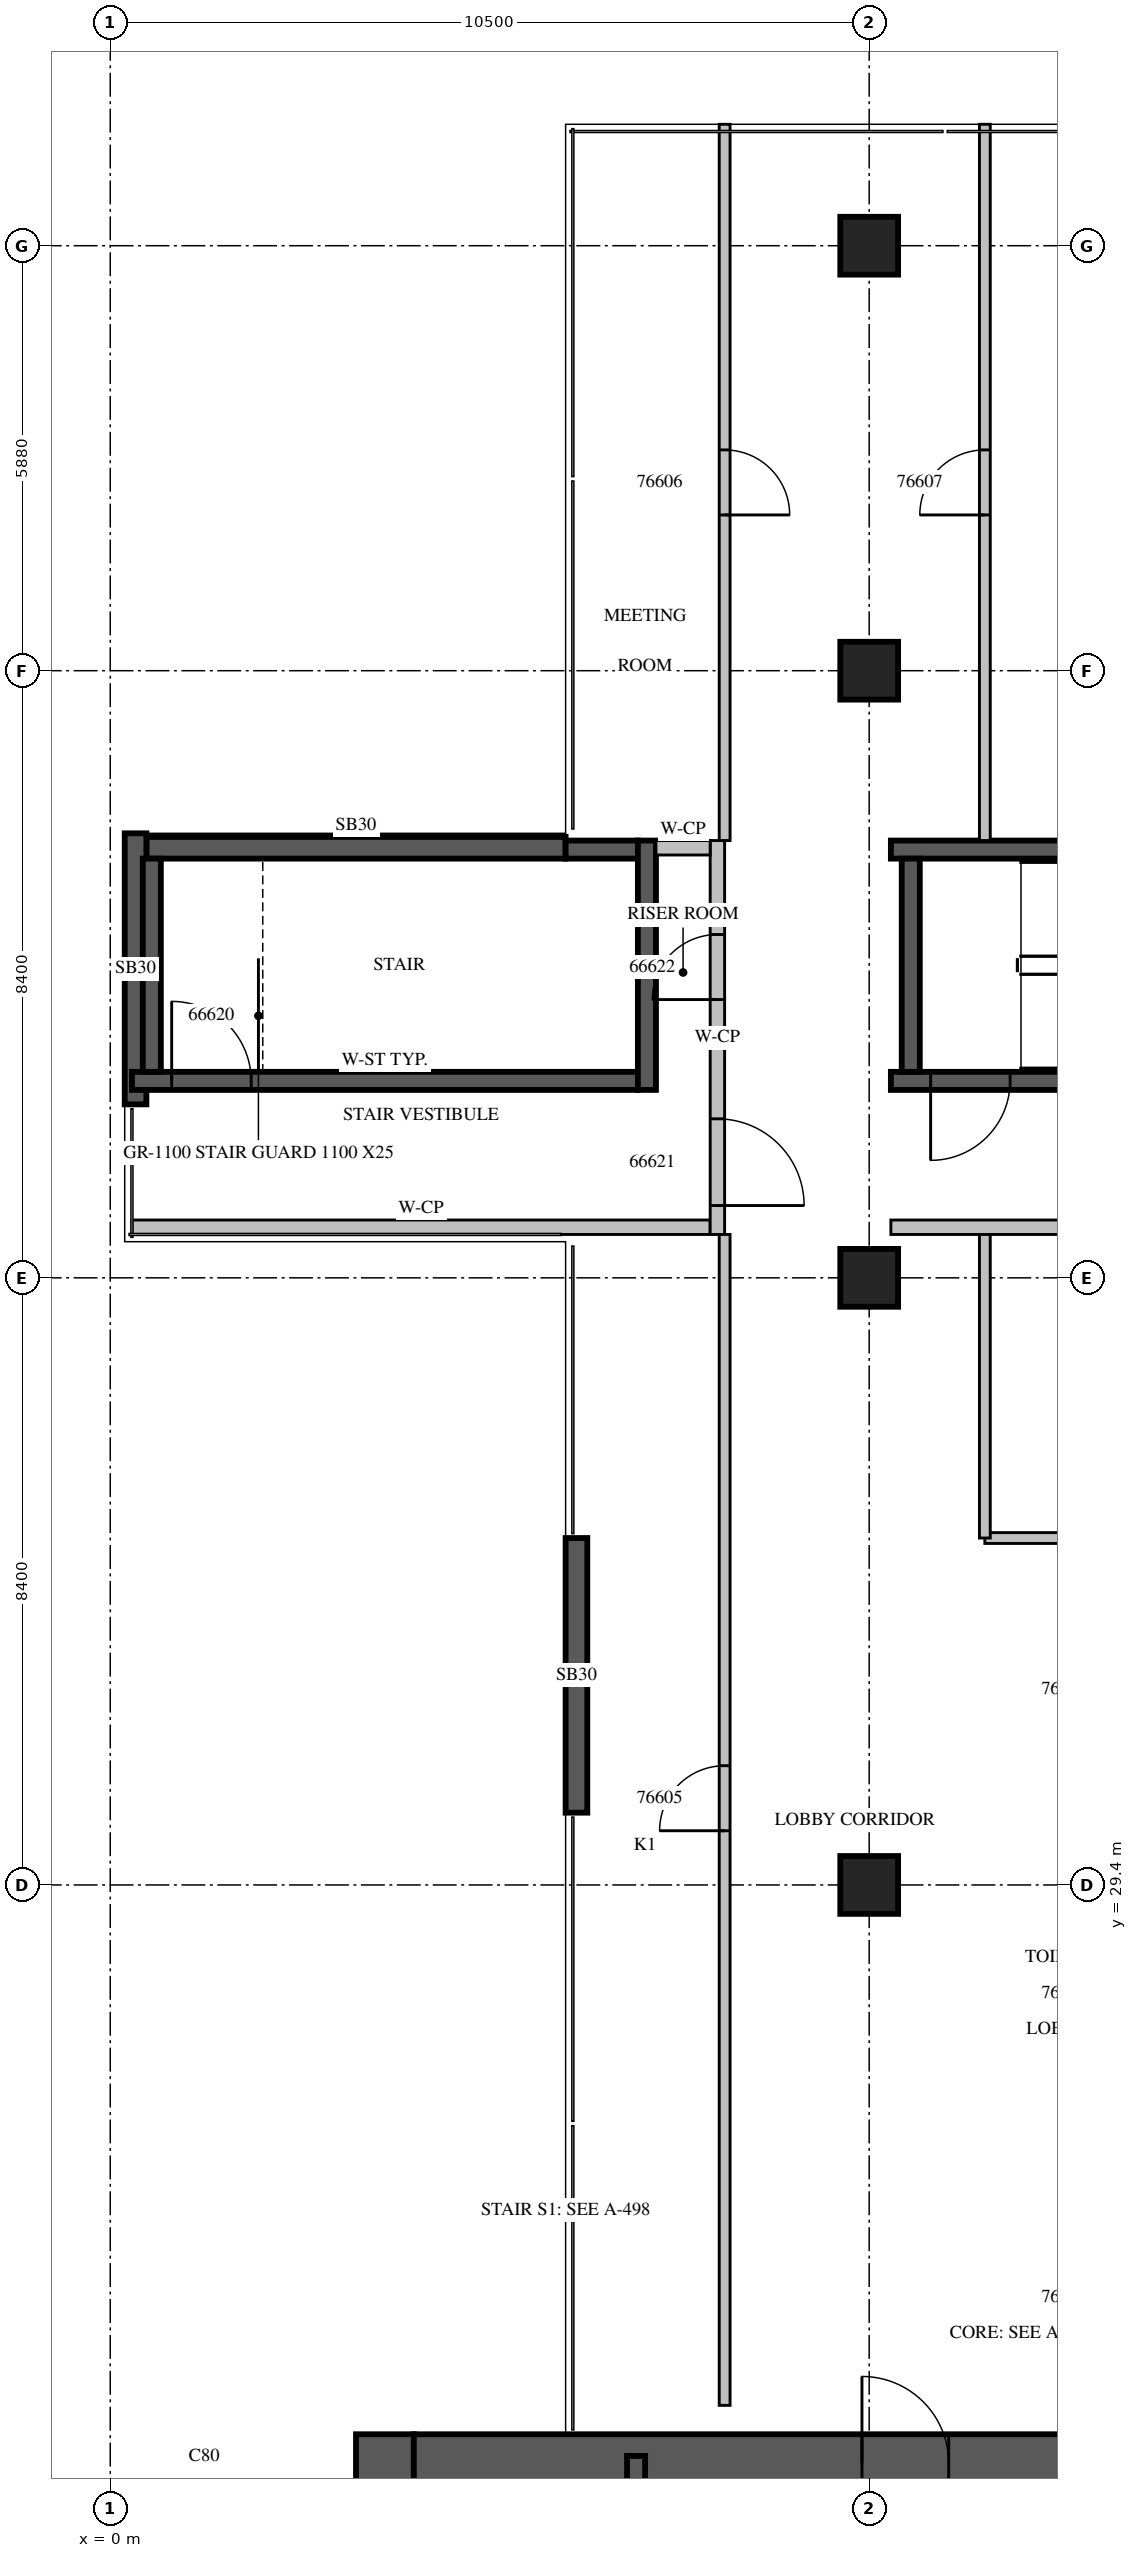
"""IFC4 building model, lengths in metres.
Left out: names, types, materials, properties, quantities, classifications, styles, units other than length and angle.
Written with IfcOpenShell. Run it as: python <this file> out.ifc"""

import sys

from ifc_helpers import new_model, si_unit, direction, frame, frame_2d, origin, origin_2d, place, context, subcontext, project, spatial, rectangle, extrude, source, transform, mapped, element, fill, save


model = new_model("IFC4")
c1 = context("Model", 3, precision=1e-05, world=origin(), true_north=direction((0.0, 1.0)))
c2 = subcontext(c1, "Body", "Model", "MODEL_VIEW")
j1 = project(units=[si_unit("LENGTHUNIT", "METRE"), si_unit("PLANEANGLEUNIT", "RADIAN")], contexts=[c1])
p1 = place(None, origin())
s1 = spatial("IfcSite", under=j1, at=p1, CompositionType="ELEMENT")
p2 = place(p1, origin())
s2 = spatial("IfcBuilding", under=s1, at=p2, CompositionType="ELEMENT")
p3 = place(p2, frame((0.0, 0.0, 277.0)))
s3 = spatial("IfcBuildingStorey", under=s2, at=p3, CompositionType="ELEMENT", Elevation=277.0)
m1 = source(origin(), c2, "Body", "SweptSolid", [
    extrude(rectangle(XDim=0.8, YDim=0.8, at=origin_2d()), origin(), (0.0, 0.0, 1.0), 7.5),
])
for number, where, z_axis, x_axis in (
    (1, (10.5, 29.4, 0.0), (0.0, 0.0, 1.0), (1.0, 0.0, 0.0)),
    (2, (10.5, 37.8, 0.0), (0.0, 0.0, 1.0), (1.0, 0.0, 0.0)),
    (3, (10.5, 46.2, 0.0), (0.0, 0.0, 1.0), (1.0, 0.0, 0.0)),
    (4, (10.5, 52.08, 0.0), (0.0, 0.0, 1.0), (1.0, 0.0, 0.0)),
):
    element("IfcColumn", number, at=place(p3, frame(where, z_axis=z_axis, x_axis=x_axis)), inside=s3, PredefinedType="COLUMN", context=c2, shape_type="MappedRepresentation", body=[
        mapped(m1, transform((0.0, 0.0, 0.0), scale=1.0)),
    ])
p4 = place(p3, frame((3.8, 4.2, 0.0), z_axis=(0.0, 0.0, 1.0), x_axis=(0.0, 1.0, 0.0)))
e5 = element("IfcWall", 5, at=p4, inside=s3, PredefinedType="SHEAR", context=c2, shape_type="SweptSolid", body=[
    extrude(rectangle(XDim=17.6, YDim=0.8, at=frame_2d((8.8, 0.0))), origin(), (0.0, 0.0, 1.0), 7.5),
])
m2 = source(origin(), c2, "Body", "SweptSolid", [
    extrude(rectangle(XDim=2.2, YDim=2.1, at=frame_2d((1.1, 1.05))), frame((0.0, 0.41, 0.0), z_axis=(0.0, -1.0, 0.0), x_axis=(1.0, 0.0, 0.0)), (0.0, 0.0, 1.0), 0.82),
])
p5 = place(p4, frame((4.2, 0.0, 0.0)))
e6 = element("IfcOpeningElement", 6, at=p5, cuts=e5, PredefinedType="OPENING", context=c2, shape_type="MappedRepresentation", body=[
    mapped(m2, transform((0.0, 0.0, 0.0), scale=1.0)),
])
m3 = source(origin(), c2, "Body", "SweptSolid", [
    extrude(rectangle(XDim=16.8, YDim=0.8, at=frame_2d((8.4, 0.0))), origin(), (0.0, 0.0, 1.0), 7.5),
])
p6 = place(p3, frame((4.2, 21.4, 0.0), z_axis=(0.0, 0.0, 1.0), x_axis=(1.0, 0.0, 0.0)))
e7 = element("IfcWall", 7, at=p6, inside=s3, PredefinedType="SHEAR", context=c2, shape_type="MappedRepresentation", body=[
    mapped(m3, transform((0.0, 0.0, 0.0), scale=1.0)),
])
m4 = source(origin(), c2, "Body", "SweptSolid", [
    extrude(rectangle(XDim=1.2, YDim=2.1, at=frame_2d((0.6, 1.05))), frame((0.0, 0.41, 0.0), z_axis=(0.0, -1.0, 0.0), x_axis=(1.0, 0.0, 0.0)), (0.0, 0.0, 1.0), 0.82),
])
p7 = place(p6, frame((6.2, 0.0, 0.0)))
e8 = element("IfcOpeningElement", 8, at=p7, cuts=e7, PredefinedType="OPENING", context=c2, shape_type="MappedRepresentation", body=[
    mapped(m4, transform((0.0, 0.0, 0.0), scale=1.0)),
])
m5 = source(origin(), c2, "Body", "SweptSolid", [
    extrude(rectangle(XDim=5.8, YDim=0.3, at=frame_2d((2.9, 0.0))), origin(), (0.0, 0.0, 1.0), 7.1),
])
p8 = place(p3, frame((6.3, 43.75, 0.0), z_axis=(0.0, 0.0, 1.0), x_axis=(-1.0, 0.0, 0.0)))
e9 = element("IfcWall", 9, at=p8, inside=s3, PredefinedType="SOLIDWALL", context=c2, shape_type="MappedRepresentation", body=[
    mapped(m5, transform((0.0, 0.0, 0.0), scale=1.0)),
])
m6 = source(origin(), c2, "Body", "SweptSolid", [
    extrude(rectangle(XDim=3.75, YDim=0.3, at=frame_2d((1.875, 0.0))), origin(), (0.0, 0.0, 1.0), 7.1),
])
p9 = place(p3, frame((0.35, 43.95, 0.0), z_axis=(0.0, 0.0, 1.0), x_axis=(0.0, -1.0, 0.0)))
e10 = element("IfcWall", 10, at=p9, inside=s3, PredefinedType="SOLIDWALL", context=c2, shape_type="MappedRepresentation", body=[
    mapped(m6, transform((0.0, 0.0, 0.0), scale=1.0)),
])
m7 = source(origin(), c2, "Body", "SweptSolid", [
    extrude(rectangle(XDim=3.8, YDim=0.3, at=frame_2d((1.9, 0.0))), origin(), (0.0, 0.0, 1.0), 7.1),
])
p10 = place(p3, frame((6.45, 34.2, 0.0), z_axis=(0.0, 0.0, 1.0), x_axis=(0.0, -1.0, 0.0)))
e11 = element("IfcWall", 11, at=p10, inside=s3, PredefinedType="SOLIDWALL", context=c2, shape_type="MappedRepresentation", body=[
    mapped(m7, transform((0.0, 0.0, 0.0), scale=1.0)),
])
m8 = source(origin(), c2, "Body", "SweptSolid", [
    extrude(rectangle(XDim=6.6, YDim=0.25, at=frame_2d((3.3, 0.0))), origin(), (0.0, 0.0, 1.0), 7.1),
])
p11 = place(p3, frame((7.275, 14.9, 0.0), z_axis=(0.0, 0.0, 1.0), x_axis=(0.0, 1.0, 0.0)))
e12 = element("IfcWall", 12, at=p11, inside=s3, PredefinedType="SOLIDWALL", context=c2, shape_type="MappedRepresentation", body=[
    mapped(m8, transform((0.0, 0.0, 0.0), scale=1.0)),
])
m9 = source(origin(), c2, "Body", "SweptSolid", [
    extrude(rectangle(XDim=1.1, YDim=2.1, at=frame_2d((0.55, 1.05))), frame((0.0, 0.135, 0.0), z_axis=(0.0, -1.0, 0.0), x_axis=(1.0, 0.0, 0.0)), (0.0, 0.0, 1.0), 0.27),
])
p12 = place(p11, frame((0.15, 0.0, 0.0)))
e13 = element("IfcOpeningElement", 13, at=p12, cuts=e12, PredefinedType="OPENING", context=c2, shape_type="MappedRepresentation", body=[
    mapped(m9, transform((0.0, 0.0, 0.0), scale=1.0)),
])
m10 = source(origin(), c2, "Body", "SweptSolid", [
    extrude(rectangle(XDim=7.0, YDim=0.25, at=frame_2d((3.5, 0.0))), origin(), (0.0, 0.0, 1.0), 7.1),
])
p13 = place(p3, frame((0.3, 40.525, 0.0), z_axis=(0.0, 0.0, 1.0), x_axis=(1.0, 0.0, 0.0)))
e14 = element("IfcWall", 14, at=p13, inside=s3, PredefinedType="SOLIDWALL", context=c2, shape_type="MappedRepresentation", body=[
    mapped(m10, transform((0.0, 0.0, 0.0), scale=1.0)),
])
p14 = place(p13, frame((0.55, 0.0, 0.0)))
e15 = element("IfcOpeningElement", 15, at=p14, cuts=e14, PredefinedType="OPENING", context=c2, shape_type="MappedRepresentation", body=[
    mapped(m9, transform((0.0, 0.0, 0.0), scale=1.0)),
])
m11 = source(origin(), c2, "Body", "SweptSolid", [
    extrude(rectangle(XDim=1.0, YDim=0.25, at=frame_2d((0.5, 0.0))), origin(), (0.0, 0.0, 1.0), 7.1),
])
p15 = place(p3, frame((6.3, 43.725, 0.0), z_axis=(0.0, 0.0, 1.0), x_axis=(1.0, 0.0, 0.0)))
e16 = element("IfcWall", 16, at=p15, inside=s3, PredefinedType="SOLIDWALL", context=c2, shape_type="MappedRepresentation", body=[
    mapped(m11, transform((0.0, 0.0, 0.0), scale=1.0)),
])
m12 = source(origin(), c2, "Body", "SweptSolid", [
    extrude(rectangle(XDim=3.45, YDim=0.25, at=frame_2d((1.725, 0.0))), origin(), (0.0, 0.0, 1.0), 7.1),
])
p16 = place(p3, frame((7.425, 40.4, 0.0), z_axis=(0.0, 0.0, 1.0), x_axis=(0.0, 1.0, 0.0)))
e17 = element("IfcWall", 17, at=p16, inside=s3, PredefinedType="SOLIDWALL", context=c2, shape_type="MappedRepresentation", body=[
    mapped(m12, transform((0.0, 0.0, 0.0), scale=1.0)),
])
m13 = source(origin(), c2, "Body", "SweptSolid", [
    extrude(rectangle(XDim=2.95, YDim=0.25, at=frame_2d((1.475, 0.0))), origin(), (0.0, 0.0, 1.0), 7.1),
])
p17 = place(p3, frame((0.575, 40.65, 0.0), z_axis=(0.0, 0.0, 1.0), x_axis=(0.0, 1.0, 0.0)))
e18 = element("IfcWall", 18, at=p17, inside=s3, PredefinedType="SOLIDWALL", context=c2, shape_type="MappedRepresentation", body=[
    mapped(m13, transform((0.0, 0.0, 0.0), scale=1.0)),
])
m14 = source(origin(), c2, "Body", "SweptSolid", [
    extrude(rectangle(XDim=8.0, YDim=0.2, at=frame_2d((4.0, 0.0))), origin(), (0.0, 0.0, 1.0), 7.1),
])
p18 = place(p3, frame((0.3, 38.5, 0.0), z_axis=(0.0, 0.0, 1.0), x_axis=(1.0, 0.0, 0.0)))
e19 = element("IfcWall", 19, at=p18, inside=s3, PredefinedType="PARTITIONING", context=c2, shape_type="MappedRepresentation", body=[
    mapped(m14, transform((0.0, 0.0, 0.0), scale=1.0)),
])
m15 = source(origin(), c2, "Body", "SweptSolid", [
    extrude(rectangle(XDim=5.45, YDim=0.2, at=frame_2d((2.725, 0.0))), origin(), (0.0, 0.0, 1.0), 7.1),
])
p19 = place(p3, frame((8.4, 38.4, 0.0), z_axis=(0.0, 0.0, 1.0), x_axis=(0.0, 1.0, 0.0)))
e20 = element("IfcWall", 20, at=p19, inside=s3, PredefinedType="PARTITIONING", context=c2, shape_type="MappedRepresentation", body=[
    mapped(m15, transform((0.0, 0.0, 0.0), scale=1.0)),
])
m16 = source(origin(), c2, "Body", "SweptSolid", [
    extrude(rectangle(XDim=1.2, YDim=2.1, at=frame_2d((0.6, 1.05))), frame((0.0, 0.11, 0.0), z_axis=(0.0, -1.0, 0.0), x_axis=(1.0, 0.0, 0.0)), (0.0, 0.0, 1.0), 0.22),
])
p20 = place(p19, frame((0.4, 0.0, 0.0)))
e21 = element("IfcOpeningElement", 21, at=p20, cuts=e20, PredefinedType="OPENING", context=c2, shape_type="MappedRepresentation", body=[
    mapped(m16, transform((0.0, 0.0, 0.0), scale=1.0)),
])
m17 = source(origin(), c2, "Body", "SweptSolid", [
    extrude(rectangle(XDim=0.9, YDim=2.1, at=frame_2d((0.45, 1.05))), frame((0.0, 0.11, 0.0), z_axis=(0.0, -1.0, 0.0), x_axis=(1.0, 0.0, 0.0)), (0.0, 0.0, 1.0), 0.22),
])
p21 = place(p19, frame((3.25, 0.0, 0.0)))
e22 = element("IfcOpeningElement", 22, at=p21, cuts=e20, PredefinedType="OPENING", context=c2, shape_type="MappedRepresentation", body=[
    mapped(m17, transform((0.0, 0.0, 0.0), scale=1.0)),
])
m18 = source(origin(), c2, "Body", "SweptSolid", [
    extrude(rectangle(XDim=0.75, YDim=0.2, at=frame_2d((0.375, 0.0))), origin(), (0.0, 0.0, 1.0), 7.1),
])
p22 = place(p3, frame((7.55, 43.75, 0.0), z_axis=(0.0, 0.0, 1.0), x_axis=(1.0, 0.0, 0.0)))
e23 = element("IfcWall", 23, at=p22, inside=s3, PredefinedType="PARTITIONING", context=c2, shape_type="MappedRepresentation", body=[
    mapped(m18, transform((0.0, 0.0, 0.0), scale=1.0)),
])
p23 = place(p3, frame((10.8, 40.525, 0.0), z_axis=(0.0, 0.0, 1.0), x_axis=(1.0, 0.0, 0.0)))
e24 = element("IfcWall", 24, at=p23, inside=s3, PredefinedType="SOLIDWALL", context=c2, shape_type="MappedRepresentation", body=[
    mapped(m10, transform((0.0, 0.0, 0.0), scale=1.0)),
])
p24 = place(p23, frame((0.55, 0.0, 0.0)))
e25 = element("IfcOpeningElement", 25, at=p24, cuts=e24, PredefinedType="OPENING", context=c2, shape_type="MappedRepresentation", body=[
    mapped(m9, transform((0.0, 0.0, 0.0), scale=1.0)),
])
p25 = place(p3, frame((10.8, 43.725, 0.0), z_axis=(0.0, 0.0, 1.0), x_axis=(1.0, 0.0, 0.0)))
e26 = element("IfcWall", 26, at=p25, inside=s3, PredefinedType="SOLIDWALL", context=c2, shape_type="MappedRepresentation", body=[
    mapped(m10, transform((0.0, 0.0, 0.0), scale=1.0)),
])
p26 = place(p3, frame((11.075, 40.65, 0.0), z_axis=(0.0, 0.0, 1.0), x_axis=(0.0, 1.0, 0.0)))
e27 = element("IfcWall", 27, at=p26, inside=s3, PredefinedType="SOLIDWALL", context=c2, shape_type="MappedRepresentation", body=[
    mapped(m13, transform((0.0, 0.0, 0.0), scale=1.0)),
])
p27 = place(p3, frame((10.8, 38.5, 0.0), z_axis=(0.0, 0.0, 1.0), x_axis=(1.0, 0.0, 0.0)))
e28 = element("IfcWall", 28, at=p27, inside=s3, PredefinedType="PARTITIONING", context=c2, shape_type="MappedRepresentation", body=[
    mapped(m14, transform((0.0, 0.0, 0.0), scale=1.0)),
])
m19 = source(origin(), c2, "Body", "SweptSolid", [
    extrude(rectangle(XDim=5.0, YDim=0.15, at=frame_2d((2.5, 0.0))), origin(), (0.0, 0.0, 1.0), 7.1),
])
p28 = place(p3, frame((12.1, 34.2, 0.0), z_axis=(0.0, 0.0, 1.0), x_axis=(1.0, 0.0, 0.0)))
e29 = element("IfcWall", 29, at=p28, inside=s3, PredefinedType="PARTITIONING", context=c2, shape_type="MappedRepresentation", body=[
    mapped(m19, transform((0.0, 0.0, 0.0), scale=1.0)),
])
m20 = source(origin(), c2, "Body", "SweptSolid", [
    extrude(rectangle(XDim=16.2, YDim=0.15, at=frame_2d((8.1, 0.0))), origin(), (0.0, 0.0, 1.0), 7.1),
])
p29 = place(p3, frame((8.5, 22.2, 0.0), z_axis=(0.0, 0.0, 1.0), x_axis=(0.0, 1.0, 0.0)))
e30 = element("IfcWall", 30, at=p29, inside=s3, PredefinedType="PARTITIONING", context=c2, shape_type="MappedRepresentation", body=[
    mapped(m20, transform((0.0, 0.0, 0.0), scale=1.0)),
])
m21 = source(origin(), c2, "Body", "SweptSolid", [
    extrude(rectangle(XDim=0.9, YDim=2.1, at=frame_2d((0.45, 1.05))), frame((0.0, 0.085, 0.0), z_axis=(0.0, -1.0, 0.0), x_axis=(1.0, 0.0, 0.0)), (0.0, 0.0, 1.0), 0.17),
])
p30 = place(p29, frame((7.95, 0.0, 0.0)))
e31 = element("IfcOpeningElement", 31, at=p30, cuts=e30, PredefinedType="OPENING", context=c2, shape_type="MappedRepresentation", body=[
    mapped(m21, transform((0.0, 0.0, 0.0), scale=1.0)),
])
m22 = source(origin(), c2, "Body", "SweptSolid", [
    extrude(rectangle(XDim=9.91, YDim=0.15, at=frame_2d((4.955, 0.0))), origin(), (0.0, 0.0, 1.0), 7.1),
])
p31 = place(p3, frame((8.5, 43.85, 0.0), z_axis=(0.0, 0.0, 1.0), x_axis=(0.0, 1.0, 0.0)))
e32 = element("IfcWall", 32, at=p31, inside=s3, PredefinedType="PARTITIONING", context=c2, shape_type="MappedRepresentation", body=[
    mapped(m22, transform((0.0, 0.0, 0.0), scale=1.0)),
])
p32 = place(p31, frame((4.505, 0.0, 0.0)))
e33 = element("IfcOpeningElement", 33, at=p32, cuts=e32, PredefinedType="OPENING", context=c2, shape_type="MappedRepresentation", body=[
    mapped(m21, transform((0.0, 0.0, 0.0), scale=1.0)),
])
p33 = place(p3, frame((12.1, 34.2, 0.0), z_axis=(0.0, 0.0, 1.0), x_axis=(0.0, 1.0, 0.0)))
e34 = element("IfcWall", 34, at=p33, inside=s3, PredefinedType="PARTITIONING", context=c2, shape_type="SweptSolid", body=[
    extrude(rectangle(XDim=4.2, YDim=0.15, at=frame_2d((2.1, 0.0))), origin(), (0.0, 0.0, 1.0), 7.1),
])
p34 = place(p3, frame((12.1, 43.85, 0.0), z_axis=(0.0, 0.0, 1.0), x_axis=(0.0, 1.0, 0.0)))
e35 = element("IfcWall", 35, at=p34, inside=s3, PredefinedType="PARTITIONING", context=c2, shape_type="MappedRepresentation", body=[
    mapped(m22, transform((0.0, 0.0, 0.0), scale=1.0)),
])
p35 = place(p34, frame((4.505, 0.0, 0.0)))
e36 = element("IfcOpeningElement", 36, at=p35, cuts=e35, PredefinedType="OPENING", context=c2, shape_type="MappedRepresentation", body=[
    mapped(m21, transform((0.0, 0.0, 0.0), scale=1.0)),
])
m23 = source(origin(), c2, "Body", "SweptSolid", [
    extrude(rectangle(XDim=1.1, YDim=2.1, at=frame_2d((0.55, 1.05))), frame((0.0, 0.025, 0.0), z_axis=(0.0, -1.0, 0.0), x_axis=(1.0, 0.0, 0.0)), (0.0, 0.0, 1.0), 0.05),
])
p36 = place(p14, origin())
e37 = element("IfcDoor", 37, at=p36, inside=s3, OperationType="SINGLE_SWING_LEFT", PredefinedType="DOOR", context=c2, shape_type="MappedRepresentation", body=[
    mapped(m23, transform((0.0, 0.0, 0.0), scale=1.0)),
])
fill(e15, e37)
m24 = source(origin(), c2, "Body", "SweptSolid", [
    extrude(rectangle(XDim=1.2, YDim=2.1, at=frame_2d((0.6, 1.05))), frame((0.0, 0.025, 0.0), z_axis=(0.0, -1.0, 0.0), x_axis=(1.0, 0.0, 0.0)), (0.0, 0.0, 1.0), 0.05),
])
p37 = place(p20, origin())
e38 = element("IfcDoor", 38, at=p37, inside=s3, OperationType="SINGLE_SWING_RIGHT", PredefinedType="DOOR", context=c2, shape_type="MappedRepresentation", body=[
    mapped(m24, transform((0.0, 0.0, 0.0), scale=1.0)),
])
fill(e21, e38)
m25 = source(origin(), c2, "Body", "SweptSolid", [
    extrude(rectangle(XDim=0.9, YDim=2.1, at=frame_2d((0.45, 1.05))), frame((0.0, 0.025, 0.0), z_axis=(0.0, -1.0, 0.0), x_axis=(1.0, 0.0, 0.0)), (0.0, 0.0, 1.0), 0.05),
])
p38 = place(p21, origin())
e39 = element("IfcDoor", 39, at=p38, inside=s3, OperationType="SINGLE_SWING_LEFT", PredefinedType="DOOR", context=c2, shape_type="MappedRepresentation", body=[
    mapped(m25, transform((0.0, 0.0, 0.0), scale=1.0)),
])
fill(e22, e39)
p39 = place(p24, origin())
e40 = element("IfcDoor", 40, at=p39, inside=s3, OperationType="SINGLE_SWING_RIGHT", PredefinedType="DOOR", context=c2, shape_type="MappedRepresentation", body=[
    mapped(m23, transform((0.0, 0.0, 0.0), scale=1.0)),
])
fill(e25, e40)
p40 = place(p7, origin())
e41 = element("IfcDoor", 41, at=p40, inside=s3, OperationType="SINGLE_SWING_LEFT", PredefinedType="DOOR", context=c2, shape_type="MappedRepresentation", body=[
    mapped(m24, transform((0.0, 0.0, 0.0), scale=1.0)),
])
fill(e8, e41)
p41 = place(p30, origin())
e42 = element("IfcDoor", 42, at=p41, inside=s3, OperationType="SINGLE_SWING_LEFT", PredefinedType="DOOR", context=c2, shape_type="MappedRepresentation", body=[
    mapped(m25, transform((0.0, 0.0, 0.0), scale=1.0)),
])
fill(e31, e42)
p42 = place(p32, origin())
e43 = element("IfcDoor", 43, at=p42, inside=s3, OperationType="SINGLE_SWING_RIGHT", PredefinedType="DOOR", context=c2, shape_type="MappedRepresentation", body=[
    mapped(m25, transform((0.0, 0.0, 0.0), scale=1.0)),
])
fill(e33, e43)
p43 = place(p35, origin())
e44 = element("IfcDoor", 44, at=p43, inside=s3, OperationType="SINGLE_SWING_LEFT", PredefinedType="DOOR", context=c2, shape_type="MappedRepresentation", body=[
    mapped(m25, transform((0.0, 0.0, 0.0), scale=1.0)),
])
fill(e36, e44)
save(model, sys.argv[1])
